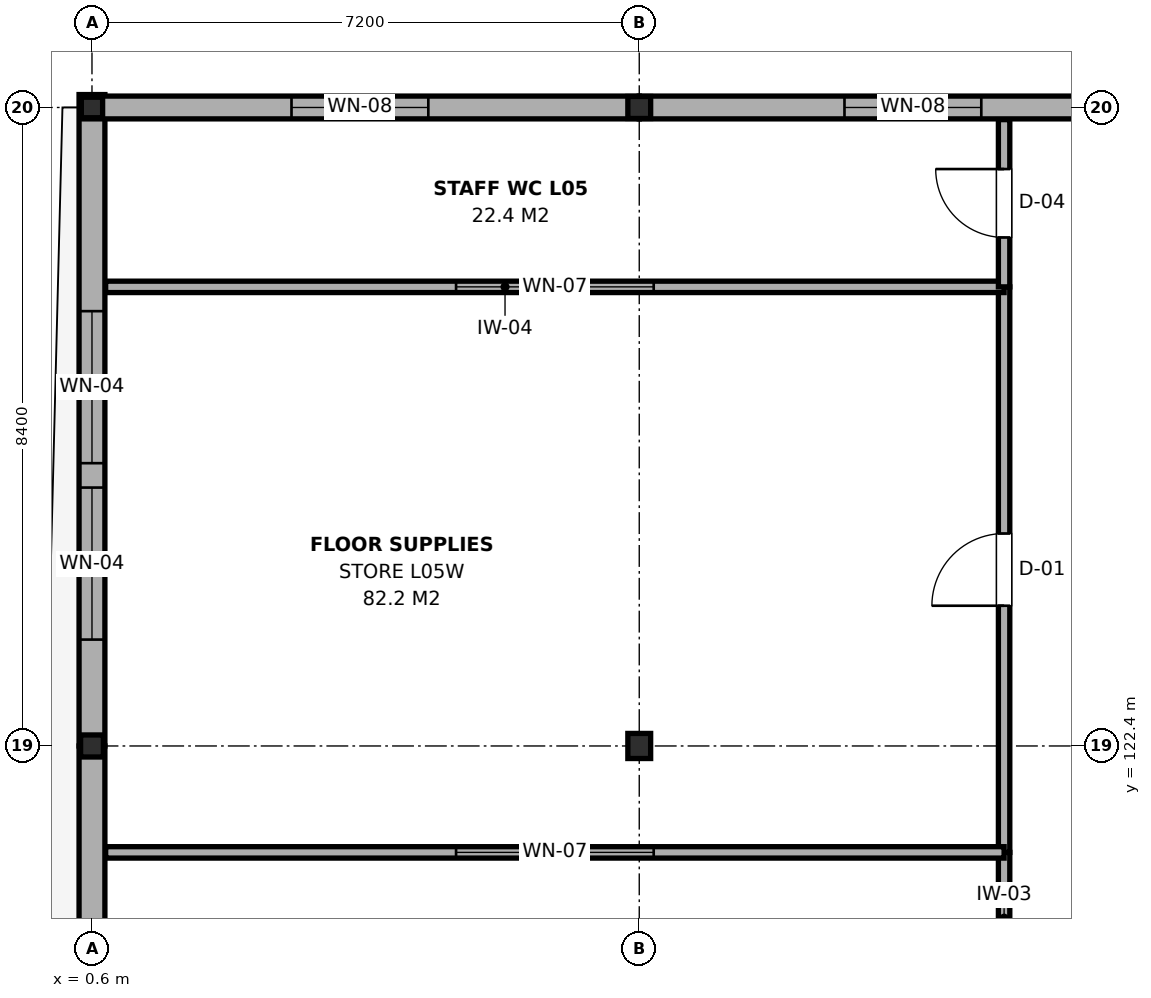
"""IFC4 building model, lengths in metres.
Left out: names, types, materials, properties, quantities, classifications, styles, units other than length and angle.
Written with IfcOpenShell. Run it as: python <this file> out.ifc"""

import sys

from ifc_helpers import new_model, si_unit, direction, frame, frame_2d, origin, origin_2d, place, context, subcontext, project, spatial, rectangle, i_section, extrude, element, fill, save


model = new_model("IFC4")
c1 = context("Model", 3, precision=1e-05, world=origin(), true_north=direction((0.0, 1.0)))
c2 = subcontext(c1, "Body", "Model", "MODEL_VIEW")
j1 = project(units=[si_unit("LENGTHUNIT", "METRE"), si_unit("PLANEANGLEUNIT", "RADIAN")], contexts=[c1])
p1 = place(None, origin())
s1 = spatial("IfcSite", under=j1, at=p1, CompositionType="ELEMENT")
p2 = place(p1, origin())
s2 = spatial("IfcBuilding", under=s1, at=p2, CompositionType="ELEMENT")
p3 = place(p2, frame((0.0, 0.0, 21.0)))
s3 = spatial("IfcBuildingStorey", under=s2, at=p3, CompositionType="ELEMENT", Elevation=21.0)
p4 = place(p3, frame((0.6, 122.4, 0.0), z_axis=(0.0, 0.0, 1.0), x_axis=(1.0, 0.0, 0.0)))
e1 = element("IfcColumn", 1, at=p4, inside=s3, PredefinedType="COLUMN", context=c2, shape_type="SweptSolid", body=[
    extrude(i_section(OverallWidth=0.3, OverallDepth=0.29, WebThickness=0.009, FlangeThickness=0.014, FilletRadius=0.027, at=origin_2d()), origin(), (0.0, 0.0, 1.0), 3.7),
])
p5 = place(p3, frame((0.6, 130.8, 0.0), z_axis=(0.0, 0.0, 1.0), x_axis=(1.0, 0.0, 0.0)))
e2 = element("IfcColumn", 2, at=p5, inside=s3, PredefinedType="COLUMN", context=c2, shape_type="SweptSolid", body=[
    extrude(i_section(OverallWidth=0.28, OverallDepth=0.27, WebThickness=0.008, FlangeThickness=0.013, FilletRadius=0.024, at=origin_2d()), origin(), (0.0, 0.0, 1.0), 3.7),
])
p6 = place(p3, frame((7.8, 122.4, 0.0), z_axis=(0.0, 0.0, 1.0), x_axis=(1.0, 0.0, 0.0)))
e3 = element("IfcColumn", 3, at=p6, inside=s3, PredefinedType="COLUMN", context=c2, shape_type="SweptSolid", body=[
    extrude(i_section(OverallWidth=0.3, OverallDepth=0.33, WebThickness=0.01, FlangeThickness=0.017, FilletRadius=0.027, at=origin_2d()), origin(), (0.0, 0.0, 1.0), 3.7),
])
p7 = place(p3, frame((7.8, 130.8, 0.0), z_axis=(0.0, 0.0, 1.0), x_axis=(1.0, 0.0, 0.0)))
e4 = element("IfcColumn", 4, at=p7, inside=s3, PredefinedType="COLUMN", context=c2, shape_type="SweptSolid", body=[
    extrude(i_section(OverallWidth=0.3, OverallDepth=0.29, WebThickness=0.009, FlangeThickness=0.014, FilletRadius=0.027, at=origin_2d()), origin(), (0.0, 0.0, 1.0), 3.7),
])
p8 = place(p3, frame((0.6, 113.4, 0.0), z_axis=(0.0, 0.0, 1.0), x_axis=(0.0, 1.0, 0.0)))
e5 = element("IfcWall", 5, at=p8, inside=s3, PredefinedType="SOLIDWALL", context=c2, shape_type="SweptSolid", body=[
    extrude(rectangle(XDim=9.0, YDim=0.34, at=frame_2d((4.5, 0.0))), origin(), (0.0, 0.0, 1.0), 3.105),
])
p9 = place(p8, frame((1.52, 0.0, 0.9)))
e6 = element("IfcOpeningElement", 6, at=p9, cuts=e5, PredefinedType="OPENING", context=c2, shape_type="SweptSolid", body=[
    extrude(rectangle(XDim=2.0, YDim=1.8, at=frame_2d((1.0, 0.9))), frame((0.0, 0.185, 0.0), z_axis=(0.0, -1.0, 0.0), x_axis=(1.0, 0.0, 0.0)), (0.0, 0.0, 1.0), 0.37),
])
p10 = place(p8, frame((4.53, 0.0, 0.9)))
e7 = element("IfcOpeningElement", 7, at=p10, cuts=e5, PredefinedType="OPENING", context=c2, shape_type="SweptSolid", body=[
    extrude(rectangle(XDim=2.0, YDim=1.8, at=frame_2d((1.0, 0.9))), frame((0.0, 0.185, 0.0), z_axis=(0.0, -1.0, 0.0), x_axis=(1.0, 0.0, 0.0)), (0.0, 0.0, 1.0), 0.37),
])
p11 = place(p3, frame((0.6, 122.4, 0.0), z_axis=(0.0, 0.0, 1.0), x_axis=(0.0, 1.0, 0.0)))
e8 = element("IfcWall", 8, at=p11, inside=s3, PredefinedType="SOLIDWALL", context=c2, shape_type="SweptSolid", body=[
    extrude(rectangle(XDim=8.57, YDim=0.34, at=frame_2d((4.285, 0.0))), origin(), (0.0, 0.0, 1.0), 3.155),
])
p12 = place(p11, frame((1.4, 0.0, 0.9)))
e9 = element("IfcOpeningElement", 9, at=p12, cuts=e8, PredefinedType="OPENING", context=c2, shape_type="SweptSolid", body=[
    extrude(rectangle(XDim=2.0, YDim=1.8, at=frame_2d((1.0, 0.9))), frame((0.0, 0.185, 0.0), z_axis=(0.0, -1.0, 0.0), x_axis=(1.0, 0.0, 0.0)), (0.0, 0.0, 1.0), 0.37),
])
p13 = place(p11, frame((3.72, 0.0, 0.9)))
e10 = element("IfcOpeningElement", 10, at=p13, cuts=e8, PredefinedType="OPENING", context=c2, shape_type="SweptSolid", body=[
    extrude(rectangle(XDim=2.0, YDim=1.8, at=frame_2d((1.0, 0.9))), frame((0.0, 0.185, 0.0), z_axis=(0.0, -1.0, 0.0), x_axis=(1.0, 0.0, 0.0)), (0.0, 0.0, 1.0), 0.37),
])
p14 = place(p3, frame((0.45, 130.8, 0.0), z_axis=(0.0, 0.0, 1.0), x_axis=(1.0, 0.0, 0.0)))
e11 = element("IfcWall", 11, at=p14, inside=s3, PredefinedType="SOLIDWALL", context=c2, shape_type="SweptSolid", body=[
    extrude(rectangle(XDim=7.35, YDim=0.3, at=frame_2d((3.675, 0.0))), origin(), (0.0, 0.0, 1.0), 3.095),
])
p15 = place(p14, frame((2.775, 0.0, 0.65)))
e12 = element("IfcOpeningElement", 12, at=p15, cuts=e11, PredefinedType="OPENING", context=c2, shape_type="SweptSolid", body=[
    extrude(rectangle(XDim=1.8, YDim=1.2, at=frame_2d((0.9, 0.6))), frame((0.0, 0.165, 0.0), z_axis=(0.0, -1.0, 0.0), x_axis=(1.0, 0.0, 0.0)), (0.0, 0.0, 1.0), 0.33),
])
p16 = place(p3, frame((7.8, 130.8, 0.0), z_axis=(0.0, 0.0, 1.0), x_axis=(1.0, 0.0, 0.0)))
e13 = element("IfcWall", 13, at=p16, inside=s3, PredefinedType="SOLIDWALL", context=c2, shape_type="SweptSolid", body=[
    extrude(rectangle(XDim=7.2, YDim=0.3, at=frame_2d((3.6, 0.0))), origin(), (0.0, 0.0, 1.0), 3.095),
])
p17 = place(p16, frame((2.7, 0.0, 0.65)))
e14 = element("IfcOpeningElement", 14, at=p17, cuts=e13, PredefinedType="OPENING", context=c2, shape_type="SweptSolid", body=[
    extrude(rectangle(XDim=1.8, YDim=1.2, at=frame_2d((0.9, 0.6))), frame((0.0, 0.165, 0.0), z_axis=(0.0, -1.0, 0.0), x_axis=(1.0, 0.0, 0.0)), (0.0, 0.0, 1.0), 0.33),
])
p18 = place(p3, frame((12.6, 110.0, 0.0), z_axis=(0.0, 0.0, 1.0), x_axis=(0.0, 1.0, 0.0)))
e15 = element("IfcWall", 15, at=p18, inside=s3, PredefinedType="PARTITIONING", context=c2, shape_type="SweptSolid", body=[
    extrude(rectangle(XDim=11.0, YDim=0.15, at=frame_2d((5.5, 0.0))), origin(), (0.0, 0.0, 1.0), 3.245),
])
p19 = place(p18, frame((4.975, 0.0, 0.0)))
e16 = element("IfcOpeningElement", 16, at=p19, cuts=e15, PredefinedType="OPENING", context=c2, shape_type="SweptSolid", body=[
    extrude(rectangle(XDim=1.05, YDim=2.15, at=frame_2d((0.525, 1.075))), frame((0.0, 0.09, 0.0), z_axis=(0.0, -1.0, 0.0), x_axis=(1.0, 0.0, 0.0)), (0.0, 0.0, 1.0), 0.18),
])
p20 = place(p18, frame((6.62, 0.0, 0.95)))
e17 = element("IfcOpeningElement", 17, at=p20, cuts=e15, PredefinedType="OPENING", context=c2, shape_type="SweptSolid", body=[
    extrude(rectangle(XDim=2.6, YDim=1.5, at=frame_2d((1.3, 0.75))), frame((0.0, 0.09, 0.0), z_axis=(0.0, -1.0, 0.0), x_axis=(1.0, 0.0, 0.0)), (0.0, 0.0, 1.0), 0.18),
])
p21 = place(p3, frame((12.6, 121.0, 0.0), z_axis=(0.0, 0.0, 1.0), x_axis=(0.0, 1.0, 0.0)))
e18 = element("IfcWall", 18, at=p21, inside=s3, PredefinedType="PARTITIONING", context=c2, shape_type="SweptSolid", body=[
    extrude(rectangle(XDim=7.44, YDim=0.15, at=frame_2d((3.72, 0.0))), origin(), (0.0, 0.0, 1.0), 3.095),
])
p22 = place(p21, frame((3.245, 0.0, 0.0)))
e19 = element("IfcOpeningElement", 19, at=p22, cuts=e18, PredefinedType="OPENING", context=c2, shape_type="SweptSolid", body=[
    extrude(rectangle(XDim=0.95, YDim=2.15, at=frame_2d((0.475, 1.075))), frame((0.0, 0.09, 0.0), z_axis=(0.0, -1.0, 0.0), x_axis=(1.0, 0.0, 0.0)), (0.0, 0.0, 1.0), 0.18),
])
p23 = place(p3, frame((0.78, 128.44, 0.0), z_axis=(0.0, 0.0, 1.0), x_axis=(1.0, 0.0, 0.0)))
e20 = element("IfcWall", 20, at=p23, inside=s3, PredefinedType="PARTITIONING", context=c2, shape_type="SweptSolid", body=[
    extrude(rectangle(XDim=11.82, YDim=0.15, at=frame_2d((5.91, 0.0))), origin(), (0.0, 0.0, 1.0), 3.105),
])
p24 = place(p23, frame((4.61, 0.0, 0.95)))
e21 = element("IfcOpeningElement", 21, at=p24, cuts=e20, PredefinedType="OPENING", context=c2, shape_type="SweptSolid", body=[
    extrude(rectangle(XDim=2.6, YDim=1.5, at=frame_2d((1.3, 0.75))), frame((0.0, 0.09, 0.0), z_axis=(0.0, -1.0, 0.0), x_axis=(1.0, 0.0, 0.0)), (0.0, 0.0, 1.0), 0.18),
])
p25 = place(p3, frame((12.6, 128.44, 0.0), z_axis=(0.0, 0.0, 1.0), x_axis=(0.0, 1.0, 0.0)))
e22 = element("IfcWall", 22, at=p25, inside=s3, PredefinedType="PARTITIONING", context=c2, shape_type="SweptSolid", body=[
    extrude(rectangle(XDim=2.2, YDim=0.15, at=frame_2d((1.1, 0.0))), origin(), (0.0, 0.0, 1.0), 3.145),
])
p26 = place(p25, frame((0.65, 0.0, 0.0)))
e23 = element("IfcOpeningElement", 23, at=p26, cuts=e22, PredefinedType="OPENING", context=c2, shape_type="SweptSolid", body=[
    extrude(rectangle(XDim=0.9, YDim=2.15, at=frame_2d((0.45, 1.075))), frame((0.0, 0.09, 0.0), z_axis=(0.0, -1.0, 0.0), x_axis=(1.0, 0.0, 0.0)), (0.0, 0.0, 1.0), 0.18),
])
p27 = place(p3, frame((0.78, 121.0, 0.0), z_axis=(0.0, 0.0, 1.0), x_axis=(1.0, 0.0, 0.0)))
e24 = element("IfcWall", 24, at=p27, inside=s3, PredefinedType="PARTITIONING", context=c2, shape_type="SweptSolid", body=[
    extrude(rectangle(XDim=11.82, YDim=0.15, at=frame_2d((5.91, 0.0))), origin(), (0.0, 0.0, 1.0), 3.155),
])
p28 = place(p27, frame((4.61, 0.0, 0.95)))
e25 = element("IfcOpeningElement", 25, at=p28, cuts=e24, PredefinedType="OPENING", context=c2, shape_type="SweptSolid", body=[
    extrude(rectangle(XDim=2.6, YDim=1.5, at=frame_2d((1.3, 0.75))), frame((0.0, 0.09, 0.0), z_axis=(0.0, -1.0, 0.0), x_axis=(1.0, 0.0, 0.0)), (0.0, 0.0, 1.0), 0.18),
])
p29 = place(p12, origin())
e26 = element("IfcWindow", 26, at=p29, inside=s3, PartitioningType="SINGLE_PANEL", PredefinedType="WINDOW", context=c2, shape_type="SweptSolid", body=[
    extrude(rectangle(XDim=2.0, YDim=1.8, at=frame_2d((1.0, 0.9))), frame((0.0, 0.03, 0.0), z_axis=(0.0, -1.0, 0.0), x_axis=(1.0, 0.0, 0.0)), (0.0, 0.0, 1.0), 0.06),
])
fill(e9, e26)
p30 = place(p13, origin())
e27 = element("IfcWindow", 27, at=p30, inside=s3, PartitioningType="SINGLE_PANEL", PredefinedType="WINDOW", context=c2, shape_type="SweptSolid", body=[
    extrude(rectangle(XDim=2.0, YDim=1.8, at=frame_2d((1.0, 0.9))), frame((0.0, 0.03, 0.0), z_axis=(0.0, -1.0, 0.0), x_axis=(1.0, 0.0, 0.0)), (0.0, 0.0, 1.0), 0.06),
])
fill(e10, e27)
p31 = place(p15, origin())
e28 = element("IfcWindow", 28, at=p31, inside=s3, PartitioningType="SINGLE_PANEL", PredefinedType="WINDOW", context=c2, shape_type="SweptSolid", body=[
    extrude(rectangle(XDim=1.8, YDim=1.2, at=frame_2d((0.9, 0.6))), frame((0.0, 0.03, 0.0), z_axis=(0.0, -1.0, 0.0), x_axis=(1.0, 0.0, 0.0)), (0.0, 0.0, 1.0), 0.06),
])
fill(e12, e28)
p32 = place(p17, origin())
e29 = element("IfcWindow", 29, at=p32, inside=s3, PartitioningType="SINGLE_PANEL", PredefinedType="WINDOW", context=c2, shape_type="SweptSolid", body=[
    extrude(rectangle(XDim=1.8, YDim=1.2, at=frame_2d((0.9, 0.6))), frame((0.0, 0.03, 0.0), z_axis=(0.0, -1.0, 0.0), x_axis=(1.0, 0.0, 0.0)), (0.0, 0.0, 1.0), 0.06),
])
fill(e14, e29)
p33 = place(p22, origin())
e30 = element("IfcDoor", 30, at=p33, inside=s3, OperationType="SINGLE_SWING_LEFT", PredefinedType="DOOR", context=c2, shape_type="SweptSolid", body=[
    extrude(rectangle(XDim=0.95, YDim=2.15, at=frame_2d((0.475, 1.075))), frame((0.0, 0.025, 0.0), z_axis=(0.0, -1.0, 0.0), x_axis=(1.0, 0.0, 0.0)), (0.0, 0.0, 1.0), 0.05),
])
fill(e19, e30)
p34 = place(p24, origin())
e31 = element("IfcWindow", 31, at=p34, inside=s3, PartitioningType="SINGLE_PANEL", PredefinedType="WINDOW", context=c2, shape_type="SweptSolid", body=[
    extrude(rectangle(XDim=2.6, YDim=1.5, at=frame_2d((1.3, 0.75))), frame((0.0, 0.03, 0.0), z_axis=(0.0, -1.0, 0.0), x_axis=(1.0, 0.0, 0.0)), (0.0, 0.0, 1.0), 0.06),
])
fill(e21, e31)
p35 = place(p26, origin())
e32 = element("IfcDoor", 32, at=p35, inside=s3, OperationType="SINGLE_SWING_RIGHT", PredefinedType="DOOR", context=c2, shape_type="SweptSolid", body=[
    extrude(rectangle(XDim=0.9, YDim=2.15, at=frame_2d((0.45, 1.075))), frame((0.0, 0.025, 0.0), z_axis=(0.0, -1.0, 0.0), x_axis=(1.0, 0.0, 0.0)), (0.0, 0.0, 1.0), 0.05),
])
fill(e23, e32)
p36 = place(p28, origin())
e33 = element("IfcWindow", 33, at=p36, inside=s3, PartitioningType="SINGLE_PANEL", PredefinedType="WINDOW", context=c2, shape_type="SweptSolid", body=[
    extrude(rectangle(XDim=2.6, YDim=1.5, at=frame_2d((1.3, 0.75))), frame((0.0, 0.03, 0.0), z_axis=(0.0, -1.0, 0.0), x_axis=(1.0, 0.0, 0.0)), (0.0, 0.0, 1.0), 0.06),
])
fill(e25, e33)
save(model, sys.argv[1])
